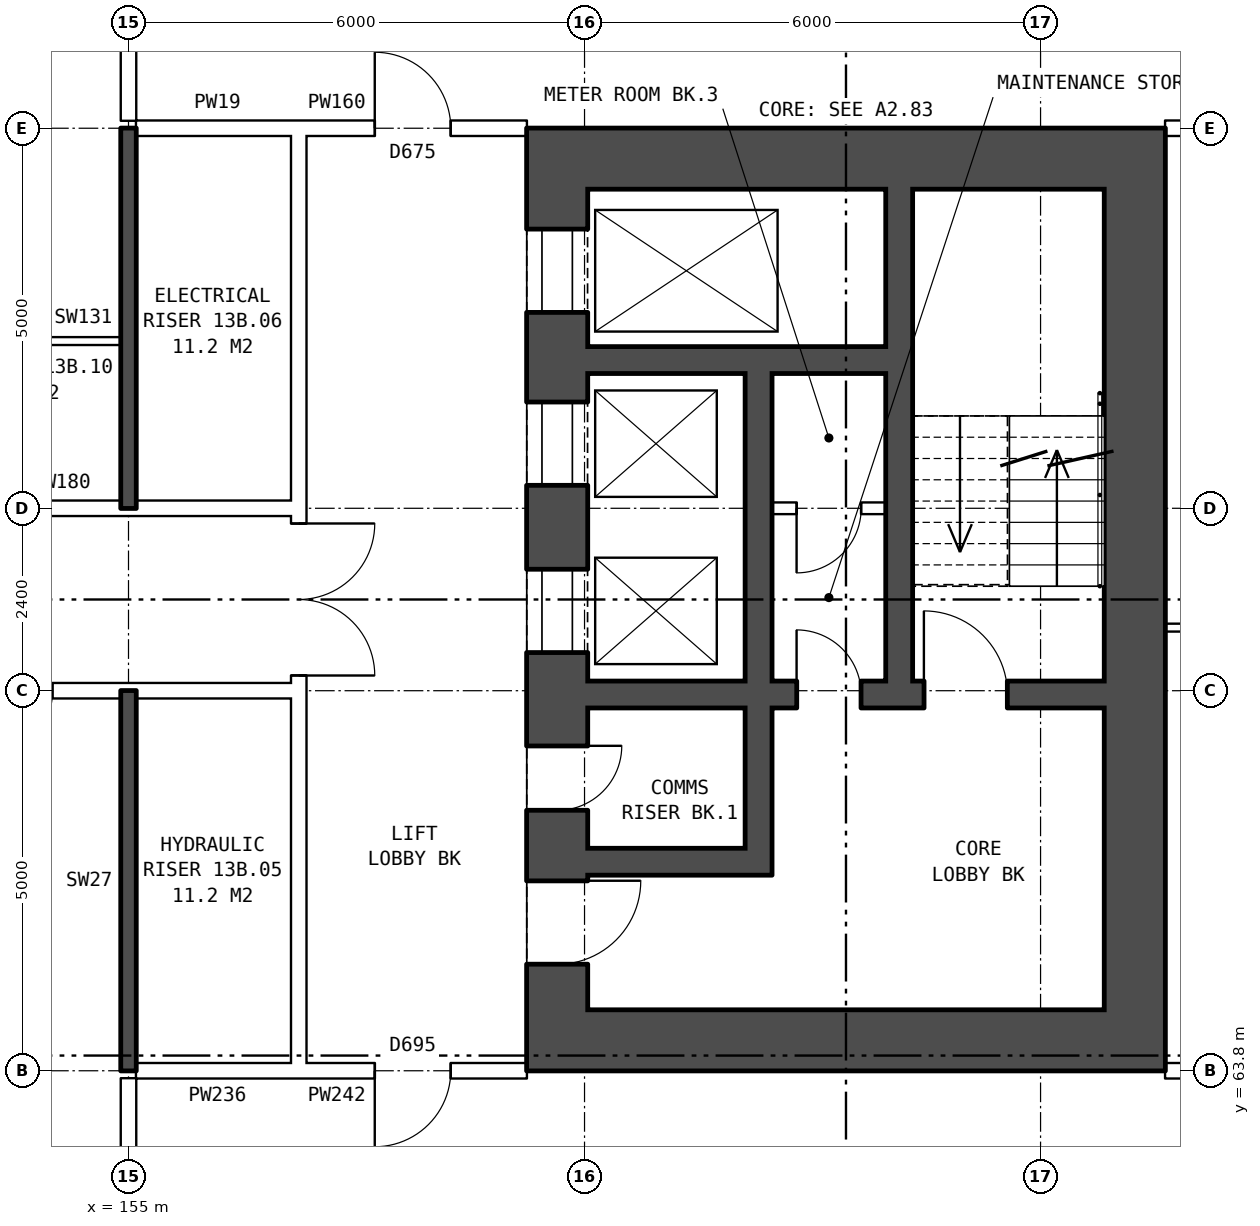
"""IFC4 building model, lengths in metres.
Left out: names, types, materials, properties, quantities, classifications, styles, units other than length and angle.
Written with IfcOpenShell. Run it as: python <this file> out.ifc"""

import sys

from ifc_helpers import new_model, si_unit, direction, frame, frame_2d, origin, place, context, subcontext, project, spatial, rectangle, extrude, element, fill, save


model = new_model("IFC4")
c1 = context("Model", 3, precision=1e-05, world=origin(), true_north=direction((0.0, 1.0)))
c2 = subcontext(c1, "Body", "Model", "MODEL_VIEW")
j1 = project(units=[si_unit("LENGTHUNIT", "METRE"), si_unit("PLANEANGLEUNIT", "RADIAN")], contexts=[c1])
p1 = place(None, origin())
s1 = spatial("IfcSite", under=j1, at=p1, CompositionType="ELEMENT")
p2 = place(p1, origin())
s2 = spatial("IfcBuilding", under=s1, at=p2, CompositionType="ELEMENT")
p3 = place(p2, frame((0.0, 0.0, 50.5)))
s3 = spatial("IfcBuildingStorey", under=s2, at=p3, CompositionType="ELEMENT", Elevation=50.5)
p4 = place(p3, frame((160.64, 75.4, 0.0), z_axis=(0.0, 0.0, 1.0), x_axis=(0.0, -1.0, 0.0)))
e1 = element("IfcWall", 1, at=p4, inside=s3, PredefinedType="SHEAR", context=c2, shape_type="SweptSolid", body=[
    extrude(rectangle(XDim=10.8, YDim=0.8, at=frame_2d((5.4, 0.0))), origin(), (0.0, 0.0, 1.0), 2.85),
])
p5 = place(p4, frame((0.525, 0.0, 0.0)))
e2 = element("IfcOpeningElement", 2, at=p5, cuts=e1, PredefinedType="OPENING", context=c2, shape_type="SweptSolid", body=[
    extrude(rectangle(XDim=1.1, YDim=2.1, at=frame_2d((0.55, 1.05))), frame((0.0, 0.41, 0.0), z_axis=(0.0, -1.0, 0.0), x_axis=(1.0, 0.0, 0.0)), (0.0, 0.0, 1.0), 0.82),
])
p6 = place(p4, frame((2.8, 0.0, 0.0)))
e3 = element("IfcOpeningElement", 3, at=p6, cuts=e1, PredefinedType="OPENING", context=c2, shape_type="SweptSolid", body=[
    extrude(rectangle(XDim=1.1, YDim=2.1, at=frame_2d((0.55, 1.05))), frame((0.0, 0.41, 0.0), z_axis=(0.0, -1.0, 0.0), x_axis=(1.0, 0.0, 0.0)), (0.0, 0.0, 1.0), 0.82),
])
p7 = place(p4, frame((5.0, 0.0, 0.0)))
e4 = element("IfcOpeningElement", 4, at=p7, cuts=e1, PredefinedType="OPENING", context=c2, shape_type="SweptSolid", body=[
    extrude(rectangle(XDim=1.1, YDim=2.1, at=frame_2d((0.55, 1.05))), frame((0.0, 0.41, 0.0), z_axis=(0.0, -1.0, 0.0), x_axis=(1.0, 0.0, 0.0)), (0.0, 0.0, 1.0), 0.82),
])
p8 = place(p4, frame((9.1, 0.0, 0.0)))
e5 = element("IfcOpeningElement", 5, at=p8, cuts=e1, PredefinedType="OPENING", context=c2, shape_type="SweptSolid", body=[
    extrude(rectangle(XDim=1.1, YDim=2.1, at=frame_2d((0.55, 1.05))), frame((0.0, 0.41, 0.0), z_axis=(0.0, -1.0, 0.0), x_axis=(1.0, 0.0, 0.0)), (0.0, 0.0, 1.0), 0.82),
])
p9 = place(p4, frame((7.325, 0.0, 0.0)))
e6 = element("IfcOpeningElement", 6, at=p9, cuts=e1, PredefinedType="OPENING", context=c2, shape_type="SweptSolid", body=[
    extrude(rectangle(XDim=0.85, YDim=2.1, at=frame_2d((0.425, 1.05))), frame((0.0, 0.41, 0.0), z_axis=(0.0, -1.0, 0.0), x_axis=(1.0, 0.0, 0.0)), (0.0, 0.0, 1.0), 0.82),
])
p10 = place(p3, frame((168.24, 75.4, 0.0), z_axis=(0.0, 0.0, 1.0), x_axis=(0.0, -1.0, 0.0)))
e7 = element("IfcWall", 7, at=p10, inside=s3, PredefinedType="SHEAR", context=c2, shape_type="SweptSolid", body=[
    extrude(rectangle(XDim=10.8, YDim=0.8, at=frame_2d((5.4, 0.0))), origin(), (0.0, 0.0, 1.0), 2.85),
])
for number, where, z_axis, x_axis in (
    (8, (160.24, 75.8, 0.0), (0.0, 0.0, 1.0), (1.0, 0.0, 0.0)),
    (9, (160.24, 64.2, 0.0), (0.0, 0.0, 1.0), (1.0, 0.0, 0.0)),
):
    element("IfcWall", number, at=place(p3, frame(where, z_axis=z_axis, x_axis=x_axis)), inside=s3, PredefinedType="SHEAR", context=c2, shape_type="SweptSolid", body=[
        extrude(rectangle(XDim=8.4, YDim=0.8, at=frame_2d((4.2, 0.0))), origin(), (0.0, 0.0, 1.0), 2.85),
    ])
p11 = place(p3, frame((161.04, 73.15, 0.0), z_axis=(0.0, 0.0, 1.0), x_axis=(1.0, 0.0, 0.0)))
e10 = element("IfcWall", 10, at=p11, inside=s3, PredefinedType="SHEAR", context=c2, shape_type="SweptSolid", body=[
    extrude(rectangle(XDim=3.925, YDim=0.35, at=frame_2d((1.962, 0.0))), origin(), (0.0, 0.0, 1.0), 2.85),
])
p12 = place(p3, frame((163.465, 71.2, 0.0), z_axis=(0.0, 0.0, 1.0), x_axis=(1.0, 0.0, 0.0)))
e11 = element("IfcWall", 11, at=p12, inside=s3, PredefinedType="PARTITIONING", context=c2, shape_type="SweptSolid", body=[
    extrude(rectangle(XDim=1.5, YDim=0.15, at=frame_2d((0.75, 0.0))), origin(), (0.0, 0.0, 1.0), 2.85),
])
p13 = place(p12, frame((0.325, 0.0, 0.0)))
e12 = element("IfcOpeningElement", 12, at=p13, cuts=e11, PredefinedType="OPENING", context=c2, shape_type="SweptSolid", body=[
    extrude(rectangle(XDim=0.85, YDim=2.1, at=frame_2d((0.425, 1.05))), frame((0.0, 0.085, 0.0), z_axis=(0.0, -1.0, 0.0), x_axis=(1.0, 0.0, 0.0)), (0.0, 0.0, 1.0), 0.17),
])
p14 = place(p3, frame((161.04, 68.75, 0.0), z_axis=(0.0, 0.0, 1.0), x_axis=(1.0, 0.0, 0.0)))
e13 = element("IfcWall", 13, at=p14, inside=s3, PredefinedType="SHEAR", context=c2, shape_type="SweptSolid", body=[
    extrude(rectangle(XDim=6.8, YDim=0.35, at=frame_2d((3.4, 0.0))), origin(), (0.0, 0.0, 1.0), 2.85),
])
p15 = place(p14, frame((4.425, 0.0, 0.0)))
e14 = element("IfcOpeningElement", 14, at=p15, cuts=e13, PredefinedType="OPENING", context=c2, shape_type="SweptSolid", body=[
    extrude(rectangle(XDim=1.1, YDim=2.1, at=frame_2d((0.55, 1.05))), frame((0.0, 0.185, 0.0), z_axis=(0.0, -1.0, 0.0), x_axis=(1.0, 0.0, 0.0)), (0.0, 0.0, 1.0), 0.37),
])
p16 = place(p14, frame((2.75, 0.0, 0.0)))
e15 = element("IfcOpeningElement", 15, at=p16, cuts=e13, PredefinedType="OPENING", context=c2, shape_type="SweptSolid", body=[
    extrude(rectangle(XDim=0.85, YDim=2.1, at=frame_2d((0.425, 1.05))), frame((0.0, 0.185, 0.0), z_axis=(0.0, -1.0, 0.0), x_axis=(1.0, 0.0, 0.0)), (0.0, 0.0, 1.0), 0.37),
])
p17 = place(p3, frame((161.04, 66.55, 0.0), z_axis=(0.0, 0.0, 1.0), x_axis=(1.0, 0.0, 0.0)))
e16 = element("IfcWall", 16, at=p17, inside=s3, PredefinedType="SHEAR", context=c2, shape_type="SweptSolid", body=[
    extrude(rectangle(XDim=2.075, YDim=0.35, at=frame_2d((1.038, 0.0))), origin(), (0.0, 0.0, 1.0), 2.85),
])
p18 = place(p3, frame((163.29, 72.975, 0.0), z_axis=(0.0, 0.0, 1.0), x_axis=(0.0, -1.0, 0.0)))
e17 = element("IfcWall", 17, at=p18, inside=s3, PredefinedType="SHEAR", context=c2, shape_type="SweptSolid", body=[
    extrude(rectangle(XDim=4.05, YDim=0.35, at=frame_2d((2.025, 0.0))), origin(), (0.0, 0.0, 1.0), 2.85),
])
p19 = place(p3, frame((163.29, 68.575, 0.0), z_axis=(0.0, 0.0, 1.0), x_axis=(0.0, -1.0, 0.0)))
e18 = element("IfcWall", 18, at=p19, inside=s3, PredefinedType="SHEAR", context=c2, shape_type="SweptSolid", body=[
    extrude(rectangle(XDim=2.2, YDim=0.35, at=frame_2d((1.1, 0.0))), origin(), (0.0, 0.0, 1.0), 2.85),
])
p20 = place(p3, frame((165.14, 75.4, 0.0), z_axis=(0.0, 0.0, 1.0), x_axis=(0.0, -1.0, 0.0)))
e19 = element("IfcWall", 19, at=p20, inside=s3, PredefinedType="SHEAR", context=c2, shape_type="SweptSolid", body=[
    extrude(rectangle(XDim=6.475, YDim=0.35, at=frame_2d((3.237, 0.0))), origin(), (0.0, 0.0, 1.0), 2.85),
])
p21 = place(p3, frame((157.24, 63.9, 0.0), z_axis=(0.0, 0.0, 1.0), x_axis=(0.0, 1.0, 0.0)))
e20 = element("IfcWall", 20, at=p21, inside=s3, PredefinedType="PARTITIONING", context=c2, shape_type="SweptSolid", body=[
    extrude(rectangle(XDim=12.2, YDim=0.2, at=frame_2d((6.1, 0.0))), origin(), (0.0, 0.0, 1.0), 2.85),
])
p22 = place(p21, frame((5.1, 0.0, 0.0)))
e21 = element("IfcOpeningElement", 21, at=p22, cuts=e20, PredefinedType="OPENING", context=c2, shape_type="SweptSolid", body=[
    extrude(rectangle(XDim=2.0, YDim=2.1, at=frame_2d((1.0, 1.05))), frame((0.0, 0.11, 0.0), z_axis=(0.0, -1.0, 0.0), x_axis=(1.0, 0.0, 0.0)), (0.0, 0.0, 1.0), 0.22),
])
p23 = place(p3, frame((155.1, 63.8, 0.0), z_axis=(0.0, 0.0, 1.0), x_axis=(1.0, 0.0, 0.0)))
e22 = element("IfcWall", 22, at=p23, inside=s3, PredefinedType="PARTITIONING", context=c2, shape_type="SweptSolid", body=[
    extrude(rectangle(XDim=2.14, YDim=0.2, at=frame_2d((1.07, 0.0))), origin(), (0.0, 0.0, 1.0), 2.85),
])
p24 = place(p3, frame((157.24, 63.8, 0.0), z_axis=(0.0, 0.0, 1.0), x_axis=(1.0, 0.0, 0.0)))
e23 = element("IfcWall", 23, at=p24, inside=s3, PredefinedType="PARTITIONING", context=c2, shape_type="SweptSolid", body=[
    extrude(rectangle(XDim=3.0, YDim=0.2, at=frame_2d((1.5, 0.0))), origin(), (0.0, 0.0, 1.0), 2.85),
])
p25 = place(p24, frame((1.0, 0.0, 0.0)))
e24 = element("IfcOpeningElement", 24, at=p25, cuts=e23, PredefinedType="OPENING", context=c2, shape_type="SweptSolid", body=[
    extrude(rectangle(XDim=1.0, YDim=2.1, at=frame_2d((0.5, 1.05))), frame((0.0, 0.11, 0.0), z_axis=(0.0, -1.0, 0.0), x_axis=(1.0, 0.0, 0.0)), (0.0, 0.0, 1.0), 0.22),
])
p26 = place(p3, frame((168.64, 63.8, 0.0), z_axis=(0.0, 0.0, 1.0), x_axis=(1.0, 0.0, 0.0)))
e25 = element("IfcWall", 25, at=p26, inside=s3, PredefinedType="PARTITIONING", context=c2, shape_type="SweptSolid", body=[
    extrude(rectangle(XDim=4.36, YDim=0.2, at=frame_2d((2.18, 0.0))), origin(), (0.0, 0.0, 1.0), 2.85),
])
p27 = place(p3, frame((142.76, 68.8, 0.0), z_axis=(0.0, 0.0, 1.0), x_axis=(1.0, 0.0, 0.0)))
e26 = element("IfcWall", 26, at=p27, inside=s3, PredefinedType="PARTITIONING", context=c2, shape_type="SweptSolid", body=[
    extrude(rectangle(XDim=14.48, YDim=0.2, at=frame_2d((7.24, 0.0))), origin(), (0.0, 0.0, 1.0), 2.85),
])
p28 = place(p27, frame((4.24, 0.0, 0.0)))
e27 = element("IfcOpeningElement", 27, at=p28, cuts=e26, PredefinedType="OPENING", context=c2, shape_type="SweptSolid", body=[
    extrude(rectangle(XDim=1.0, YDim=2.1, at=frame_2d((0.5, 1.05))), frame((0.0, 0.11, 0.0), z_axis=(0.0, -1.0, 0.0), x_axis=(1.0, 0.0, 0.0)), (0.0, 0.0, 1.0), 0.22),
])
p29 = place(p27, frame((10.24, 0.0, 0.0)))
e28 = element("IfcOpeningElement", 28, at=p29, cuts=e26, PredefinedType="OPENING", context=c2, shape_type="SweptSolid", body=[
    extrude(rectangle(XDim=1.0, YDim=2.1, at=frame_2d((0.5, 1.05))), frame((0.0, 0.11, 0.0), z_axis=(0.0, -1.0, 0.0), x_axis=(1.0, 0.0, 0.0)), (0.0, 0.0, 1.0), 0.22),
])
p30 = place(p3, frame((168.64, 69.63, 0.0), z_axis=(0.0, 0.0, 1.0), x_axis=(1.0, 0.0, 0.0)))
e29 = element("IfcWall", 29, at=p30, inside=s3, PredefinedType="PARTITIONING", context=c2, shape_type="SweptSolid", body=[
    extrude(rectangle(XDim=4.26, YDim=0.1, at=frame_2d((2.13, 0.0))), origin(), (0.0, 0.0, 1.0), 2.85),
])
p31 = place(p3, frame((142.76, 71.2, 0.0), z_axis=(0.0, 0.0, 1.0), x_axis=(1.0, 0.0, 0.0)))
e30 = element("IfcWall", 30, at=p31, inside=s3, PredefinedType="PARTITIONING", context=c2, shape_type="SweptSolid", body=[
    extrude(rectangle(XDim=14.48, YDim=0.2, at=frame_2d((7.24, 0.0))), origin(), (0.0, 0.0, 1.0), 2.85),
])
p32 = place(p31, frame((1.12, 0.0, 0.0)))
e31 = element("IfcOpeningElement", 31, at=p32, cuts=e30, PredefinedType="OPENING", context=c2, shape_type="SweptSolid", body=[
    extrude(rectangle(XDim=1.0, YDim=2.1, at=frame_2d((0.5, 1.05))), frame((0.0, 0.11, 0.0), z_axis=(0.0, -1.0, 0.0), x_axis=(1.0, 0.0, 0.0)), (0.0, 0.0, 1.0), 0.22),
])
p33 = place(p31, frame((7.24, 0.0, 0.0)))
e32 = element("IfcOpeningElement", 32, at=p33, cuts=e30, PredefinedType="OPENING", context=c2, shape_type="SweptSolid", body=[
    extrude(rectangle(XDim=1.0, YDim=2.1, at=frame_2d((0.5, 1.05))), frame((0.0, 0.11, 0.0), z_axis=(0.0, -1.0, 0.0), x_axis=(1.0, 0.0, 0.0)), (0.0, 0.0, 1.0), 0.22),
])
p34 = place(p3, frame((152.0, 73.4, 0.0), z_axis=(0.0, 0.0, 1.0), x_axis=(1.0, 0.0, 0.0)))
e33 = element("IfcWall", 33, at=p34, inside=s3, PredefinedType="PARTITIONING", context=c2, shape_type="SweptSolid", body=[
    extrude(rectangle(XDim=2.9, YDim=0.1, at=frame_2d((1.45, 0.0))), origin(), (0.0, 0.0, 1.0), 2.85),
])
p35 = place(p3, frame((155.1, 76.2, 0.0), z_axis=(0.0, 0.0, 1.0), x_axis=(1.0, 0.0, 0.0)))
e34 = element("IfcWall", 34, at=p35, inside=s3, PredefinedType="PARTITIONING", context=c2, shape_type="SweptSolid", body=[
    extrude(rectangle(XDim=2.14, YDim=0.2, at=frame_2d((1.07, 0.0))), origin(), (0.0, 0.0, 1.0), 2.85),
])
p36 = place(p3, frame((157.24, 76.2, 0.0), z_axis=(0.0, 0.0, 1.0), x_axis=(1.0, 0.0, 0.0)))
e35 = element("IfcWall", 35, at=p36, inside=s3, PredefinedType="PARTITIONING", context=c2, shape_type="SweptSolid", body=[
    extrude(rectangle(XDim=3.0, YDim=0.2, at=frame_2d((1.5, 0.0))), origin(), (0.0, 0.0, 1.0), 2.85),
])
p37 = place(p36, frame((1.0, 0.0, 0.0)))
e36 = element("IfcOpeningElement", 36, at=p37, cuts=e35, PredefinedType="OPENING", context=c2, shape_type="SweptSolid", body=[
    extrude(rectangle(XDim=1.0, YDim=2.1, at=frame_2d((0.5, 1.05))), frame((0.0, 0.11, 0.0), z_axis=(0.0, -1.0, 0.0), x_axis=(1.0, 0.0, 0.0)), (0.0, 0.0, 1.0), 0.22),
])
p38 = place(p3, frame((168.64, 76.2, 0.0), z_axis=(0.0, 0.0, 1.0), x_axis=(1.0, 0.0, 0.0)))
e37 = element("IfcWall", 37, at=p38, inside=s3, PredefinedType="PARTITIONING", context=c2, shape_type="SweptSolid", body=[
    extrude(rectangle(XDim=4.36, YDim=0.2, at=frame_2d((2.18, 0.0))), origin(), (0.0, 0.0, 1.0), 2.85),
])
p39 = place(p3, frame((155.0, 61.5, 0.0), z_axis=(0.0, 0.0, 1.0), x_axis=(0.0, 1.0, 0.0)))
e38 = element("IfcWall", 38, at=p39, inside=s3, PredefinedType="PARTITIONING", context=c2, shape_type="SweptSolid", body=[
    extrude(rectangle(XDim=2.2, YDim=0.2, at=frame_2d((1.1, 0.0))), origin(), (0.0, 0.0, 1.0), 2.85),
])
for number, where, z_axis, x_axis in (
    (39, (155.0, 63.8, 0.0), (0.0, 0.0, 1.0), (0.0, 1.0, 0.0)),
    (40, (155.0, 71.2, 0.0), (0.0, 0.0, 1.0), (0.0, 1.0, 0.0)),
):
    element("IfcWall", number, at=place(p3, frame(where, z_axis=z_axis, x_axis=x_axis)), inside=s3, PredefinedType="SOLIDWALL", context=c2, shape_type="SweptSolid", body=[
        extrude(rectangle(XDim=5.0, YDim=0.2, at=frame_2d((2.5, 0.0))), origin(), (0.0, 0.0, 1.0), 2.85),
    ])
p40 = place(p3, frame((155.0, 76.3, 0.0), z_axis=(0.0, 0.0, 1.0), x_axis=(0.0, 1.0, 0.0)))
e41 = element("IfcWall", 41, at=p40, inside=s3, PredefinedType="PARTITIONING", context=c2, shape_type="SweptSolid", body=[
    extrude(rectangle(XDim=2.2, YDim=0.2, at=frame_2d((1.1, 0.0))), origin(), (0.0, 0.0, 1.0), 2.85),
])
p41 = place(p5, origin())
e42 = element("IfcDoor", 42, at=p41, inside=s3, OperationType="DOUBLE_DOOR_SLIDING", PredefinedType="DOOR", context=c2, shape_type="SweptSolid", body=[
    extrude(rectangle(XDim=1.1, YDim=2.1, at=frame_2d((0.55, 1.05))), frame((0.0, 0.385, 0.0), z_axis=(0.0, -1.0, 0.0), x_axis=(1.0, 0.0, 0.0)), (0.0, 0.0, 1.0), 0.05),
])
fill(e2, e42)
p42 = place(p6, origin())
e43 = element("IfcDoor", 43, at=p42, inside=s3, OperationType="DOUBLE_DOOR_SLIDING", PredefinedType="DOOR", context=c2, shape_type="SweptSolid", body=[
    extrude(rectangle(XDim=1.1, YDim=2.1, at=frame_2d((0.55, 1.05))), frame((0.0, 0.385, 0.0), z_axis=(0.0, -1.0, 0.0), x_axis=(1.0, 0.0, 0.0)), (0.0, 0.0, 1.0), 0.05),
])
fill(e3, e43)
p43 = place(p7, origin())
e44 = element("IfcDoor", 44, at=p43, inside=s3, OperationType="DOUBLE_DOOR_SLIDING", PredefinedType="DOOR", context=c2, shape_type="SweptSolid", body=[
    extrude(rectangle(XDim=1.1, YDim=2.1, at=frame_2d((0.55, 1.05))), frame((0.0, 0.385, 0.0), z_axis=(0.0, -1.0, 0.0), x_axis=(1.0, 0.0, 0.0)), (0.0, 0.0, 1.0), 0.05),
])
fill(e4, e44)
p44 = place(p8, origin())
e45 = element("IfcDoor", 45, at=p44, inside=s3, OperationType="SINGLE_SWING_LEFT", PredefinedType="DOOR", context=c2, shape_type="SweptSolid", body=[
    extrude(rectangle(XDim=1.1, YDim=2.1, at=frame_2d((0.55, 1.05))), frame((0.0, 0.385, 0.0), z_axis=(0.0, -1.0, 0.0), x_axis=(1.0, 0.0, 0.0)), (0.0, 0.0, 1.0), 0.05),
])
fill(e5, e45)
p45 = place(p15, origin())
e46 = element("IfcDoor", 46, at=p45, inside=s3, OperationType="SINGLE_SWING_LEFT", PredefinedType="DOOR", context=c2, shape_type="SweptSolid", body=[
    extrude(rectangle(XDim=1.1, YDim=2.1, at=frame_2d((0.55, 1.05))), frame((0.0, 0.025, 0.0), z_axis=(0.0, -1.0, 0.0), x_axis=(1.0, 0.0, 0.0)), (0.0, 0.0, 1.0), 0.05),
])
fill(e14, e46)
p46 = place(p9, origin())
e47 = element("IfcDoor", 47, at=p46, inside=s3, OperationType="SINGLE_SWING_LEFT", PredefinedType="DOOR", context=c2, shape_type="SweptSolid", body=[
    extrude(rectangle(XDim=0.85, YDim=2.1, at=frame_2d((0.425, 1.05))), frame((0.0, 0.385, 0.0), z_axis=(0.0, -1.0, 0.0), x_axis=(1.0, 0.0, 0.0)), (0.0, 0.0, 1.0), 0.05),
])
fill(e6, e47)
p47 = place(p16, origin())
e48 = element("IfcDoor", 48, at=p47, inside=s3, OperationType="SINGLE_SWING_LEFT", PredefinedType="DOOR", context=c2, shape_type="SweptSolid", body=[
    extrude(rectangle(XDim=0.85, YDim=2.1, at=frame_2d((0.425, 1.05))), frame((0.0, 0.025, 0.0), z_axis=(0.0, -1.0, 0.0), x_axis=(1.0, 0.0, 0.0)), (0.0, 0.0, 1.0), 0.05),
])
fill(e15, e48)
p48 = place(p13, frame((0.85, 0.0, 0.0), z_axis=(0.0, 0.0, 1.0), x_axis=(-1.0, 0.0, 0.0)))
e49 = element("IfcDoor", 49, at=p48, inside=s3, OperationType="SINGLE_SWING_RIGHT", PredefinedType="DOOR", context=c2, shape_type="SweptSolid", body=[
    extrude(rectangle(XDim=0.85, YDim=2.1, at=frame_2d((0.425, 1.05))), frame((0.0, 0.025, 0.0), z_axis=(0.0, -1.0, 0.0), x_axis=(1.0, 0.0, 0.0)), (0.0, 0.0, 1.0), 0.05),
])
fill(e12, e49)
p49 = place(p22, frame((2.0, 0.0, 0.0), z_axis=(0.0, 0.0, 1.0), x_axis=(-1.0, 0.0, 0.0)))
e50 = element("IfcDoor", 50, at=p49, inside=s3, OperationType="DOUBLE_DOOR_SINGLE_SWING", PredefinedType="DOOR", context=c2, shape_type="SweptSolid", body=[
    extrude(rectangle(XDim=2.0, YDim=2.1, at=frame_2d((1.0, 1.05))), frame((0.0, 0.025, 0.0), z_axis=(0.0, -1.0, 0.0), x_axis=(1.0, 0.0, 0.0)), (0.0, 0.0, 1.0), 0.05),
])
fill(e21, e50)
p50 = place(p25, frame((1.0, 0.0, 0.0), z_axis=(0.0, 0.0, 1.0), x_axis=(-1.0, 0.0, 0.0)))
e51 = element("IfcDoor", 51, at=p50, inside=s3, OperationType="SINGLE_SWING_RIGHT", PredefinedType="DOOR", context=c2, shape_type="SweptSolid", body=[
    extrude(rectangle(XDim=1.0, YDim=2.1, at=frame_2d((0.5, 1.05))), frame((0.0, 0.025, 0.0), z_axis=(0.0, -1.0, 0.0), x_axis=(1.0, 0.0, 0.0)), (0.0, 0.0, 1.0), 0.05),
])
fill(e24, e51)
p51 = place(p37, origin())
e52 = element("IfcDoor", 52, at=p51, inside=s3, OperationType="SINGLE_SWING_LEFT", PredefinedType="DOOR", context=c2, shape_type="SweptSolid", body=[
    extrude(rectangle(XDim=1.0, YDim=2.1, at=frame_2d((0.5, 1.05))), frame((0.0, 0.025, 0.0), z_axis=(0.0, -1.0, 0.0), x_axis=(1.0, 0.0, 0.0)), (0.0, 0.0, 1.0), 0.05),
])
fill(e36, e52)
save(model, sys.argv[1])
